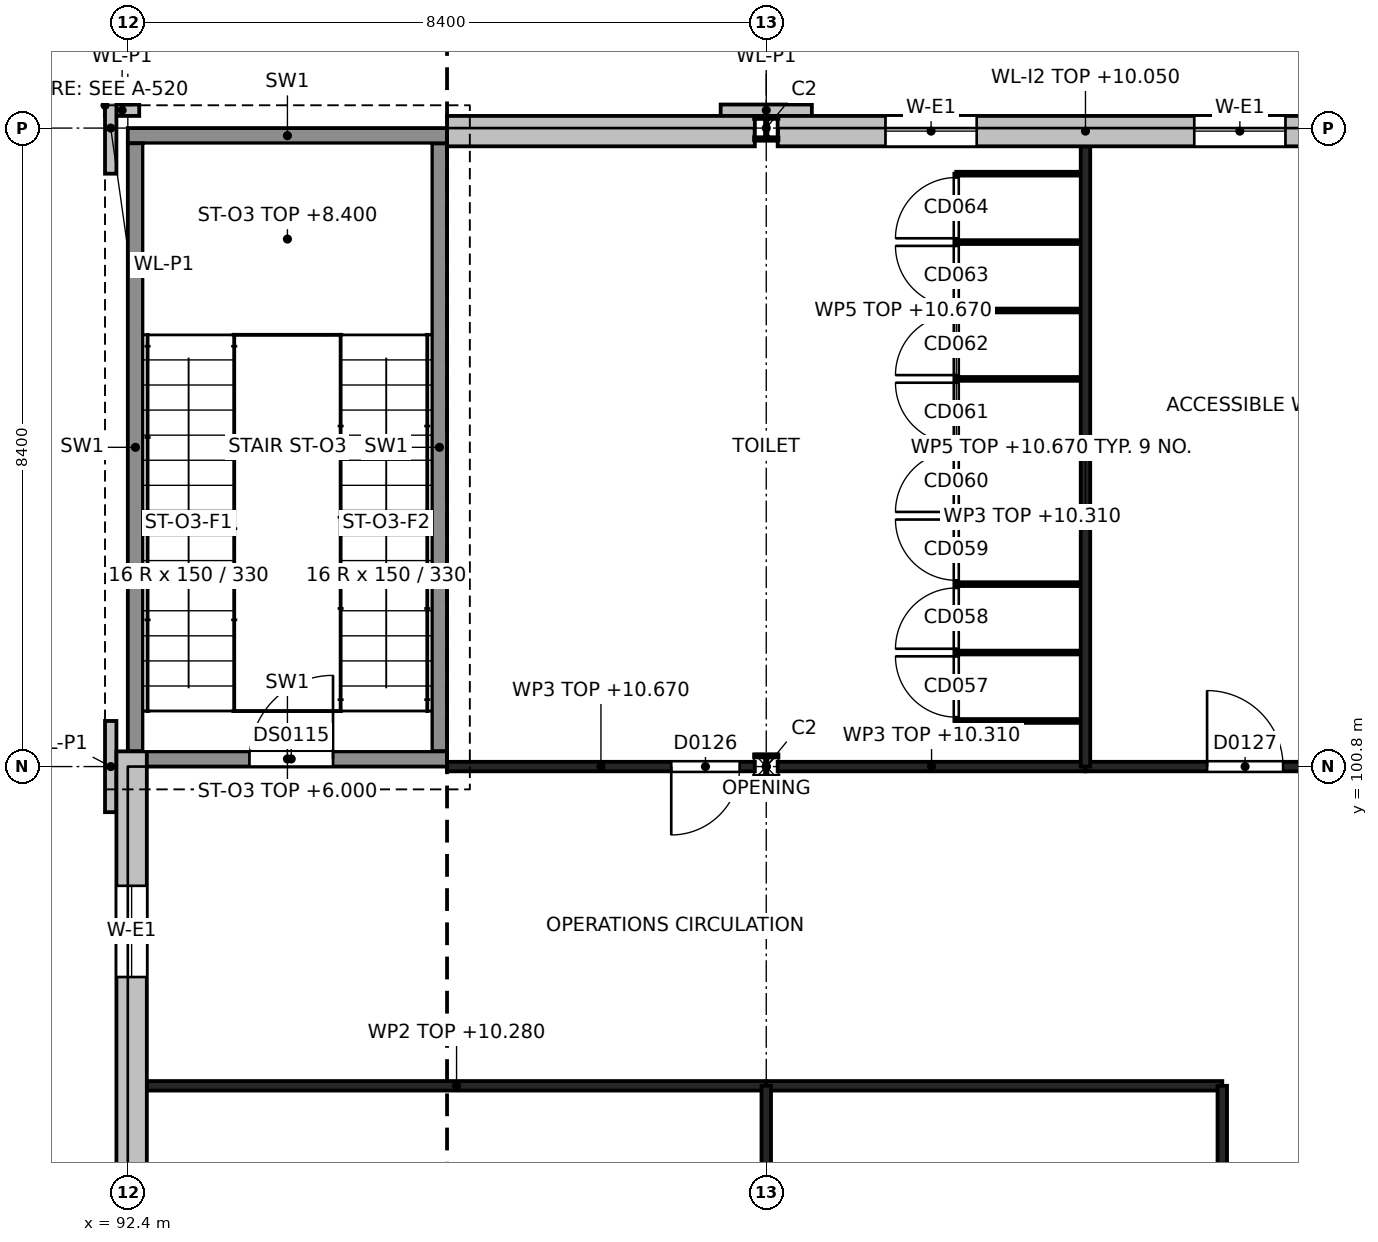
"""IFC4 building model, lengths in metres.
Left out: names, types, materials, properties, quantities, classifications, styles, units other than length and angle.
Written with IfcOpenShell. Run it as: python <this file> out.ifc"""

import sys

from ifc_helpers import new_model, si_unit, direction, frame, frame_2d, origin, origin_2d, place, context, subcontext, project, spatial, rectangle, i_section, extrude, element, fill, save


model = new_model("IFC4")
c1 = context("Model", 3, precision=1e-05, world=origin(), true_north=direction((0.0, 1.0)))
c2 = subcontext(c1, "Body", "Model", "MODEL_VIEW")
j1 = project(units=[si_unit("LENGTHUNIT", "METRE"), si_unit("PLANEANGLEUNIT", "RADIAN")], contexts=[c1])
p1 = place(None, origin())
s1 = spatial("IfcSite", under=j1, at=p1, CompositionType="ELEMENT")
p2 = place(p1, origin())
s2 = spatial("IfcBuilding", under=s1, at=p2, CompositionType="ELEMENT")
p3 = place(p2, frame((0.0, 0.0, 6.0)))
s3 = spatial("IfcBuildingStorey", under=s2, at=p3, CompositionType="ELEMENT", Elevation=6.0)
for number, where, z_axis, x_axis in (
    (1, (100.8, 100.8, 0.0), (0.0, 0.0, 1.0), (1.0, 0.0, 0.0)),
    (2, (100.8, 109.2, 0.0), (0.0, 0.0, 1.0), (1.0, 0.0, 0.0)),
):
    element("IfcColumn", number, at=place(p3, frame(where, z_axis=z_axis, x_axis=x_axis)), inside=s3, PredefinedType="COLUMN", context=c2, shape_type="SweptSolid", body=[
        extrude(i_section(OverallWidth=0.3, OverallDepth=0.3, WebThickness=0.011, FlangeThickness=0.019, at=origin_2d()), origin(), (0.0, 0.0, 1.0), 4.8),
    ])
p4 = place(p3, frame((92.4, 100.9, 0.0), z_axis=(0.0, 0.0, 1.0), x_axis=(1.0, 0.0, 0.0)))
e3 = element("IfcWall", 3, at=p4, inside=s3, PredefinedType="SHEAR", context=c2, shape_type="SweptSolid", body=[
    extrude(rectangle(XDim=4.2, YDim=0.2, at=frame_2d((2.1, 0.0))), origin(), (0.0, 0.0, 1.0), 4.8),
])
p5 = place(p4, frame((1.6, 0.0, 0.0)))
e4 = element("IfcOpeningElement", 4, at=p5, cuts=e3, PredefinedType="OPENING", context=c2, shape_type="SweptSolid", body=[
    extrude(rectangle(XDim=1.1, YDim=2.1, at=frame_2d((0.55, 1.05))), frame((0.0, 0.1, 0.0), z_axis=(0.0, -1.0, 0.0), x_axis=(1.0, 0.0, 0.0)), (0.0, 0.0, 1.0), 0.2),
])
p6 = place(p3, frame((92.4, 109.1, 0.0), z_axis=(0.0, 0.0, 1.0), x_axis=(1.0, 0.0, 0.0)))
e5 = element("IfcWall", 5, at=p6, inside=s3, PredefinedType="SHEAR", context=c2, shape_type="SweptSolid", body=[
    extrude(rectangle(XDim=4.2, YDim=0.2, at=frame_2d((2.1, 0.0))), origin(), (0.0, 0.0, 1.0), 4.8),
])
for number, where, z_axis, x_axis in (
    (6, (92.5, 101.0, 0.0), (0.0, 0.0, 1.0), (0.0, 1.0, 0.0)),
    (7, (96.5, 101.0, 0.0), (0.0, 0.0, 1.0), (0.0, 1.0, 0.0)),
):
    element("IfcWall", number, at=place(p3, frame(where, z_axis=z_axis, x_axis=x_axis)), inside=s3, PredefinedType="SHEAR", context=c2, shape_type="SweptSolid", body=[
        extrude(rectangle(XDim=8.0, YDim=0.2, at=frame_2d((4.0, 0.0))), origin(), (0.0, 0.0, 1.0), 4.8),
    ])
p7 = place(p3, frame((92.45, 92.55, 0.0), z_axis=(0.0, 0.0, 1.0), x_axis=(0.0, 1.0, 0.0)))
e8 = element("IfcWall", 8, at=p7, inside=s3, PredefinedType="SOLIDWALL", context=c2, shape_type="SweptSolid", body=[
    extrude(rectangle(XDim=8.45, YDim=0.4, at=frame_2d((4.225, 0.0))), origin(), (0.0, 0.0, 1.0), 4.05),
])
p8 = place(p7, frame((1.419, 0.0, 0.9)))
e9 = element("IfcOpeningElement", 9, at=p8, cuts=e8, PredefinedType="OPENING", context=c2, shape_type="SweptSolid", body=[
    extrude(rectangle(XDim=1.2, YDim=3.0, at=frame_2d((0.6, 1.5))), frame((0.0, 0.2, 0.0), z_axis=(0.0, -1.0, 0.0), x_axis=(1.0, 0.0, 0.0)), (0.0, 0.0, 1.0), 0.4),
])
p9 = place(p7, frame((5.481, 0.0, 0.9)))
e10 = element("IfcOpeningElement", 10, at=p9, cuts=e8, PredefinedType="OPENING", context=c2, shape_type="SweptSolid", body=[
    extrude(rectangle(XDim=1.2, YDim=3.0, at=frame_2d((0.6, 1.5))), frame((0.0, 0.2, 0.0), z_axis=(0.0, -1.0, 0.0), x_axis=(1.0, 0.0, 0.0)), (0.0, 0.0, 1.0), 0.4),
])
for number, where, z_axis, x_axis in (
    (11, (92.175, 100.2, 0.0), (0.0, 0.0, 1.0), (0.0, 1.0, 0.0)),
    (12, (92.175, 108.6, 0.0), (0.0, 0.0, 1.0), (0.0, 1.0, 0.0)),
):
    element("IfcWall", number, at=place(p3, frame(where, z_axis=z_axis, x_axis=x_axis)), inside=s3, PredefinedType="SOLIDWALL", context=c2, shape_type="SweptSolid", body=[
        extrude(rectangle(XDim=1.2, YDim=0.15, at=frame_2d((0.6, 0.0))), origin(), (0.0, 0.0, 1.0), 4.8),
    ])
p10 = place(p3, frame((96.6, 109.16, 0.0), z_axis=(0.0, 0.0, 1.0), x_axis=(1.0, 0.0, 0.0)))
e13 = element("IfcWall", 13, at=p10, inside=s3, PredefinedType="SOLIDWALL", context=c2, shape_type="SweptSolid", body=[
    extrude(rectangle(XDim=4.05, YDim=0.4, at=frame_2d((2.025, 0.0))), origin(), (0.0, 0.0, 1.0), 4.05),
])
p11 = place(p3, frame((100.95, 109.16, 0.0), z_axis=(0.0, 0.0, 1.0), x_axis=(1.0, 0.0, 0.0)))
e14 = element("IfcWall", 14, at=p11, inside=s3, PredefinedType="SOLIDWALL", context=c2, shape_type="SweptSolid", body=[
    extrude(rectangle(XDim=8.1, YDim=0.4, at=frame_2d((4.05, 0.0))), origin(), (0.0, 0.0, 1.0), 4.05),
])
p12 = place(p11, frame((1.419, 0.0, 0.9)))
e15 = element("IfcOpeningElement", 15, at=p12, cuts=e14, PredefinedType="OPENING", context=c2, shape_type="SweptSolid", body=[
    extrude(rectangle(XDim=1.2, YDim=3.0, at=frame_2d((0.6, 1.5))), frame((0.0, 0.2, 0.0), z_axis=(0.0, -1.0, 0.0), x_axis=(1.0, 0.0, 0.0)), (0.0, 0.0, 1.0), 0.4),
])
p13 = place(p11, frame((5.481, 0.0, 0.9)))
e16 = element("IfcOpeningElement", 16, at=p13, cuts=e14, PredefinedType="OPENING", context=c2, shape_type="SweptSolid", body=[
    extrude(rectangle(XDim=1.2, YDim=3.0, at=frame_2d((0.6, 1.5))), frame((0.0, 0.2, 0.0), z_axis=(0.0, -1.0, 0.0), x_axis=(1.0, 0.0, 0.0)), (0.0, 0.0, 1.0), 0.4),
])
p14 = place(p3, frame((92.1, 109.435, 0.0), z_axis=(0.0, 0.0, 1.0), x_axis=(1.0, 0.0, 0.0)))
e17 = element("IfcWall", 17, at=p14, inside=s3, PredefinedType="SOLIDWALL", context=c2, shape_type="SweptSolid", body=[
    extrude(rectangle(XDim=0.45, YDim=0.15, at=frame_2d((0.225, 0.0))), origin(), (0.0, 0.0, 1.0), 4.8),
])
p15 = place(p3, frame((100.2, 109.435, 0.0), z_axis=(0.0, 0.0, 1.0), x_axis=(1.0, 0.0, 0.0)))
e18 = element("IfcWall", 18, at=p15, inside=s3, PredefinedType="SOLIDWALL", context=c2, shape_type="SweptSolid", body=[
    extrude(rectangle(XDim=1.2, YDim=0.15, at=frame_2d((0.6, 0.0))), origin(), (0.0, 0.0, 1.0), 4.8),
])
p16 = place(p3, frame((92.65, 96.6, 0.0), z_axis=(0.0, 0.0, 1.0), x_axis=(1.0, 0.0, 0.0)))
e19 = element("IfcWall", 19, at=p16, inside=s3, PredefinedType="PARTITIONING", context=c2, shape_type="SweptSolid", body=[
    extrude(rectangle(XDim=8.15, YDim=0.125, at=frame_2d((4.075, 0.0))), origin(), (0.0, 0.0, 1.0), 4.28),
])
p17 = place(p3, frame((100.8, 96.6, 0.0), z_axis=(0.0, 0.0, 1.0), x_axis=(1.0, 0.0, 0.0)))
e20 = element("IfcWall", 20, at=p17, inside=s3, PredefinedType="PARTITIONING", context=c2, shape_type="SweptSolid", body=[
    extrude(rectangle(XDim=6.0, YDim=0.125, at=frame_2d((3.0, 0.0))), origin(), (0.0, 0.0, 1.0), 4.28),
])
p18 = place(p3, frame((106.8, 84.0, 0.0), z_axis=(0.0, 0.0, 1.0), x_axis=(0.0, 1.0, 0.0)))
e21 = element("IfcWall", 21, at=p18, inside=s3, PredefinedType="PARTITIONING", context=c2, shape_type="SweptSolid", body=[
    extrude(rectangle(XDim=12.6, YDim=0.125, at=frame_2d((6.3, 0.0))), origin(), (0.0, 0.0, 1.0), 4.31),
])
p19 = place(p18, frame((5.35, 0.0, 0.0)))
e22 = element("IfcOpeningElement", 22, at=p19, cuts=e21, PredefinedType="OPENING", context=c2, shape_type="SweptSolid", body=[
    extrude(rectangle(XDim=1.8, YDim=2.1, at=frame_2d((0.9, 1.05))), frame((0.0, 0.062, 0.0), z_axis=(0.0, -1.0, 0.0), x_axis=(1.0, 0.0, 0.0)), (0.0, 0.0, 1.0), 0.125),
])
p20 = place(p3, frame((96.6, 100.8, 0.0), z_axis=(0.0, 0.0, 1.0), x_axis=(1.0, 0.0, 0.0)))
e23 = element("IfcWall", 23, at=p20, inside=s3, PredefinedType="PARTITIONING", context=c2, shape_type="SweptSolid", body=[
    extrude(rectangle(XDim=4.05, YDim=0.125, at=frame_2d((2.025, 0.0))), origin(), (0.0, 0.0, 1.0), 4.67),
])
p21 = place(p20, frame((2.95, 0.0, 0.0)))
e24 = element("IfcOpeningElement", 24, at=p21, cuts=e23, PredefinedType="OPENING", context=c2, shape_type="SweptSolid", body=[
    extrude(rectangle(XDim=0.9, YDim=2.1, at=frame_2d((0.45, 1.05))), frame((0.0, 0.062, 0.0), z_axis=(0.0, -1.0, 0.0), x_axis=(1.0, 0.0, 0.0)), (0.0, 0.0, 1.0), 0.125),
])
p22 = place(p3, frame((100.95, 100.8, 0.0), z_axis=(0.0, 0.0, 1.0), x_axis=(1.0, 0.0, 0.0)))
e25 = element("IfcWall", 25, at=p22, inside=s3, PredefinedType="PARTITIONING", context=c2, shape_type="SweptSolid", body=[
    extrude(rectangle(XDim=4.05, YDim=0.125, at=frame_2d((2.025, 0.0))), origin(), (0.0, 0.0, 1.0), 4.31),
])
p23 = place(p3, frame((105.0, 100.8, 0.0), z_axis=(0.0, 0.0, 1.0), x_axis=(1.0, 0.0, 0.0)))
e26 = element("IfcWall", 26, at=p23, inside=s3, PredefinedType="PARTITIONING", context=c2, shape_type="SweptSolid", body=[
    extrude(rectangle(XDim=4.05, YDim=0.125, at=frame_2d((2.025, 0.0))), origin(), (0.0, 0.0, 1.0), 4.31),
])
p24 = place(p23, frame((1.6, 0.0, 0.0)))
e27 = element("IfcOpeningElement", 27, at=p24, cuts=e26, PredefinedType="OPENING", context=c2, shape_type="SweptSolid", body=[
    extrude(rectangle(XDim=1.0, YDim=2.1, at=frame_2d((0.5, 1.05))), frame((0.0, 0.062, 0.0), z_axis=(0.0, -1.0, 0.0), x_axis=(1.0, 0.0, 0.0)), (0.0, 0.0, 1.0), 0.125),
])
p25 = place(p3, frame((100.8, 92.55, 0.0), z_axis=(0.0, 0.0, 1.0), x_axis=(0.0, 1.0, 0.0)))
e28 = element("IfcWall", 28, at=p25, inside=s3, PredefinedType="PARTITIONING", context=c2, shape_type="SweptSolid", body=[
    extrude(rectangle(XDim=4.05, YDim=0.125, at=frame_2d((2.025, 0.0))), origin(), (0.0, 0.0, 1.0), 4.28),
])
p26 = place(p3, frame((105.0, 100.8, 0.0), z_axis=(0.0, 0.0, 1.0), x_axis=(0.0, 1.0, 0.0)))
e29 = element("IfcWall", 29, at=p26, inside=s3, PredefinedType="PARTITIONING", context=c2, shape_type="SweptSolid", body=[
    extrude(rectangle(XDim=8.159, YDim=0.125, at=frame_2d((4.08, 0.0))), origin(), (0.0, 0.0, 1.0), 4.31),
])
p27 = place(p3, frame((103.3, 101.4, 0.0), z_axis=(0.0, 0.0, 1.0), x_axis=(0.0, 1.0, 0.0)))
e30 = element("IfcWall", 30, at=p27, inside=s3, PredefinedType="PARTITIONING", context=c2, shape_type="SweptSolid", body=[
    extrude(rectangle(XDim=7.2, YDim=0.05, at=frame_2d((3.6, 0.0))), origin(), (0.0, 0.0, 1.0), 4.67),
])
p28 = place(p27, frame((0.05, 0.0, 0.0)))
e31 = element("IfcOpeningElement", 31, at=p28, cuts=e30, PredefinedType="OPENING", context=c2, shape_type="SweptSolid", body=[
    extrude(rectangle(XDim=0.8, YDim=2.0, at=frame_2d((0.4, 1.0))), frame((0.0, 0.025, 0.0), z_axis=(0.0, -1.0, 0.0), x_axis=(1.0, 0.0, 0.0)), (0.0, 0.0, 1.0), 0.05),
])
p29 = place(p27, frame((0.95, 0.0, 0.0)))
e32 = element("IfcOpeningElement", 32, at=p29, cuts=e30, PredefinedType="OPENING", context=c2, shape_type="SweptSolid", body=[
    extrude(rectangle(XDim=0.8, YDim=2.0, at=frame_2d((0.4, 1.0))), frame((0.0, 0.025, 0.0), z_axis=(0.0, -1.0, 0.0), x_axis=(1.0, 0.0, 0.0)), (0.0, 0.0, 1.0), 0.05),
])
p30 = place(p27, frame((1.85, 0.0, 0.0)))
e33 = element("IfcOpeningElement", 33, at=p30, cuts=e30, PredefinedType="OPENING", context=c2, shape_type="SweptSolid", body=[
    extrude(rectangle(XDim=0.8, YDim=2.0, at=frame_2d((0.4, 1.0))), frame((0.0, 0.025, 0.0), z_axis=(0.0, -1.0, 0.0), x_axis=(1.0, 0.0, 0.0)), (0.0, 0.0, 1.0), 0.05),
])
p31 = place(p27, frame((2.75, 0.0, 0.0)))
e34 = element("IfcOpeningElement", 34, at=p31, cuts=e30, PredefinedType="OPENING", context=c2, shape_type="SweptSolid", body=[
    extrude(rectangle(XDim=0.8, YDim=2.0, at=frame_2d((0.4, 1.0))), frame((0.0, 0.025, 0.0), z_axis=(0.0, -1.0, 0.0), x_axis=(1.0, 0.0, 0.0)), (0.0, 0.0, 1.0), 0.05),
])
p32 = place(p27, frame((3.65, 0.0, 0.0)))
e35 = element("IfcOpeningElement", 35, at=p32, cuts=e30, PredefinedType="OPENING", context=c2, shape_type="SweptSolid", body=[
    extrude(rectangle(XDim=0.8, YDim=2.0, at=frame_2d((0.4, 1.0))), frame((0.0, 0.025, 0.0), z_axis=(0.0, -1.0, 0.0), x_axis=(1.0, 0.0, 0.0)), (0.0, 0.0, 1.0), 0.05),
])
p33 = place(p27, frame((4.55, 0.0, 0.0)))
e36 = element("IfcOpeningElement", 36, at=p33, cuts=e30, PredefinedType="OPENING", context=c2, shape_type="SweptSolid", body=[
    extrude(rectangle(XDim=0.8, YDim=2.0, at=frame_2d((0.4, 1.0))), frame((0.0, 0.025, 0.0), z_axis=(0.0, -1.0, 0.0), x_axis=(1.0, 0.0, 0.0)), (0.0, 0.0, 1.0), 0.05),
])
p34 = place(p27, frame((5.45, 0.0, 0.0)))
e37 = element("IfcOpeningElement", 37, at=p34, cuts=e30, PredefinedType="OPENING", context=c2, shape_type="SweptSolid", body=[
    extrude(rectangle(XDim=0.8, YDim=2.0, at=frame_2d((0.4, 1.0))), frame((0.0, 0.025, 0.0), z_axis=(0.0, -1.0, 0.0), x_axis=(1.0, 0.0, 0.0)), (0.0, 0.0, 1.0), 0.05),
])
p35 = place(p27, frame((6.35, 0.0, 0.0)))
e38 = element("IfcOpeningElement", 38, at=p35, cuts=e30, PredefinedType="OPENING", context=c2, shape_type="SweptSolid", body=[
    extrude(rectangle(XDim=0.8, YDim=2.0, at=frame_2d((0.4, 1.0))), frame((0.0, 0.025, 0.0), z_axis=(0.0, -1.0, 0.0), x_axis=(1.0, 0.0, 0.0)), (0.0, 0.0, 1.0), 0.05),
])
for number, where, z_axis, x_axis in (
    (39, (105.0, 101.4, 0.0), (0.0, 0.0, 1.0), (-1.0, 0.0, 0.0)),
    (40, (105.0, 102.3, 0.0), (0.0, 0.0, 1.0), (-1.0, 0.0, 0.0)),
    (41, (105.0, 103.2, 0.0), (0.0, 0.0, 1.0), (-1.0, 0.0, 0.0)),
    (42, (105.0, 104.1, 0.0), (0.0, 0.0, 1.0), (-1.0, 0.0, 0.0)),
    (43, (105.0, 105.0, 0.0), (0.0, 0.0, 1.0), (-1.0, 0.0, 0.0)),
    (44, (105.0, 105.9, 0.0), (0.0, 0.0, 1.0), (-1.0, 0.0, 0.0)),
    (45, (105.0, 106.8, 0.0), (0.0, 0.0, 1.0), (-1.0, 0.0, 0.0)),
    (46, (105.0, 107.7, 0.0), (0.0, 0.0, 1.0), (-1.0, 0.0, 0.0)),
    (47, (105.0, 108.6, 0.0), (0.0, 0.0, 1.0), (-1.0, 0.0, 0.0)),
):
    element("IfcWall", number, at=place(p3, frame(where, z_axis=z_axis, x_axis=x_axis)), inside=s3, PredefinedType="PARTITIONING", context=c2, shape_type="SweptSolid", body=[
        extrude(rectangle(XDim=1.7, YDim=0.05, at=frame_2d((0.85, 0.0))), origin(), (0.0, 0.0, 1.0), 4.67),
    ])
p36 = place(p9, origin())
e48 = element("IfcWindow", 48, at=p36, inside=s3, PartitioningType="SINGLE_PANEL", PredefinedType="WINDOW", context=c2, shape_type="SweptSolid", body=[
    extrude(rectangle(XDim=1.2, YDim=3.0, at=frame_2d((0.6, 1.5))), frame((0.0, 0.03, 0.0), z_axis=(0.0, -1.0, 0.0), x_axis=(1.0, 0.0, 0.0)), (0.0, 0.0, 1.0), 0.06),
])
fill(e10, e48)
p37 = place(p12, origin())
e49 = element("IfcWindow", 49, at=p37, inside=s3, PartitioningType="SINGLE_PANEL", PredefinedType="WINDOW", context=c2, shape_type="SweptSolid", body=[
    extrude(rectangle(XDim=1.2, YDim=3.0, at=frame_2d((0.6, 1.5))), frame((0.0, 0.03, 0.0), z_axis=(0.0, -1.0, 0.0), x_axis=(1.0, 0.0, 0.0)), (0.0, 0.0, 1.0), 0.06),
])
fill(e15, e49)
p38 = place(p13, origin())
e50 = element("IfcWindow", 50, at=p38, inside=s3, PartitioningType="SINGLE_PANEL", PredefinedType="WINDOW", context=c2, shape_type="SweptSolid", body=[
    extrude(rectangle(XDim=1.2, YDim=3.0, at=frame_2d((0.6, 1.5))), frame((0.0, 0.03, 0.0), z_axis=(0.0, -1.0, 0.0), x_axis=(1.0, 0.0, 0.0)), (0.0, 0.0, 1.0), 0.06),
])
fill(e16, e50)
p39 = place(p21, origin())
e51 = element("IfcDoor", 51, at=p39, inside=s3, OperationType="SINGLE_SWING_LEFT", PredefinedType="DOOR", context=c2, shape_type="SweptSolid", body=[
    extrude(rectangle(XDim=0.9, YDim=2.1, at=frame_2d((0.45, 1.05))), frame((0.0, 0.025, 0.0), z_axis=(0.0, -1.0, 0.0), x_axis=(1.0, 0.0, 0.0)), (0.0, 0.0, 1.0), 0.05),
])
fill(e24, e51)
p40 = place(p24, origin())
e52 = element("IfcDoor", 52, at=p40, inside=s3, OperationType="SINGLE_SWING_LEFT", PredefinedType="DOOR", context=c2, shape_type="SweptSolid", body=[
    extrude(rectangle(XDim=1.0, YDim=2.1, at=frame_2d((0.5, 1.05))), frame((0.0, 0.025, 0.0), z_axis=(0.0, -1.0, 0.0), x_axis=(1.0, 0.0, 0.0)), (0.0, 0.0, 1.0), 0.05),
])
fill(e27, e52)
p41 = place(p5, origin())
e53 = element("IfcDoor", 53, at=p41, inside=s3, OperationType="SINGLE_SWING_RIGHT", PredefinedType="DOOR", context=c2, shape_type="SweptSolid", body=[
    extrude(rectangle(XDim=1.1, YDim=2.1, at=frame_2d((0.55, 1.05))), frame((0.0, 0.025, 0.0), z_axis=(0.0, -1.0, 0.0), x_axis=(1.0, 0.0, 0.0)), (0.0, 0.0, 1.0), 0.05),
])
fill(e4, e53)
p42 = place(p28, origin())
e54 = element("IfcDoor", 54, at=p42, inside=s3, OperationType="SINGLE_SWING_RIGHT", PredefinedType="DOOR", context=c2, shape_type="SweptSolid", body=[
    extrude(rectangle(XDim=0.8, YDim=2.0, at=frame_2d((0.4, 1.0))), frame((0.0, 0.025, 0.0), z_axis=(0.0, -1.0, 0.0), x_axis=(1.0, 0.0, 0.0)), (0.0, 0.0, 1.0), 0.05),
])
fill(e31, e54)
p43 = place(p29, origin())
e55 = element("IfcDoor", 55, at=p43, inside=s3, OperationType="SINGLE_SWING_LEFT", PredefinedType="DOOR", context=c2, shape_type="SweptSolid", body=[
    extrude(rectangle(XDim=0.8, YDim=2.0, at=frame_2d((0.4, 1.0))), frame((0.0, 0.025, 0.0), z_axis=(0.0, -1.0, 0.0), x_axis=(1.0, 0.0, 0.0)), (0.0, 0.0, 1.0), 0.05),
])
fill(e32, e55)
p44 = place(p30, origin())
e56 = element("IfcDoor", 56, at=p44, inside=s3, OperationType="SINGLE_SWING_RIGHT", PredefinedType="DOOR", context=c2, shape_type="SweptSolid", body=[
    extrude(rectangle(XDim=0.8, YDim=2.0, at=frame_2d((0.4, 1.0))), frame((0.0, 0.025, 0.0), z_axis=(0.0, -1.0, 0.0), x_axis=(1.0, 0.0, 0.0)), (0.0, 0.0, 1.0), 0.05),
])
fill(e33, e56)
p45 = place(p31, origin())
e57 = element("IfcDoor", 57, at=p45, inside=s3, OperationType="SINGLE_SWING_LEFT", PredefinedType="DOOR", context=c2, shape_type="SweptSolid", body=[
    extrude(rectangle(XDim=0.8, YDim=2.0, at=frame_2d((0.4, 1.0))), frame((0.0, 0.025, 0.0), z_axis=(0.0, -1.0, 0.0), x_axis=(1.0, 0.0, 0.0)), (0.0, 0.0, 1.0), 0.05),
])
fill(e34, e57)
p46 = place(p32, origin())
e58 = element("IfcDoor", 58, at=p46, inside=s3, OperationType="SINGLE_SWING_RIGHT", PredefinedType="DOOR", context=c2, shape_type="SweptSolid", body=[
    extrude(rectangle(XDim=0.8, YDim=2.0, at=frame_2d((0.4, 1.0))), frame((0.0, 0.025, 0.0), z_axis=(0.0, -1.0, 0.0), x_axis=(1.0, 0.0, 0.0)), (0.0, 0.0, 1.0), 0.05),
])
fill(e35, e58)
p47 = place(p33, origin())
e59 = element("IfcDoor", 59, at=p47, inside=s3, OperationType="SINGLE_SWING_LEFT", PredefinedType="DOOR", context=c2, shape_type="SweptSolid", body=[
    extrude(rectangle(XDim=0.8, YDim=2.0, at=frame_2d((0.4, 1.0))), frame((0.0, 0.025, 0.0), z_axis=(0.0, -1.0, 0.0), x_axis=(1.0, 0.0, 0.0)), (0.0, 0.0, 1.0), 0.05),
])
fill(e36, e59)
p48 = place(p34, origin())
e60 = element("IfcDoor", 60, at=p48, inside=s3, OperationType="SINGLE_SWING_RIGHT", PredefinedType="DOOR", context=c2, shape_type="SweptSolid", body=[
    extrude(rectangle(XDim=0.8, YDim=2.0, at=frame_2d((0.4, 1.0))), frame((0.0, 0.025, 0.0), z_axis=(0.0, -1.0, 0.0), x_axis=(1.0, 0.0, 0.0)), (0.0, 0.0, 1.0), 0.05),
])
fill(e37, e60)
p49 = place(p35, origin())
e61 = element("IfcDoor", 61, at=p49, inside=s3, OperationType="SINGLE_SWING_LEFT", PredefinedType="DOOR", context=c2, shape_type="SweptSolid", body=[
    extrude(rectangle(XDim=0.8, YDim=2.0, at=frame_2d((0.4, 1.0))), frame((0.0, 0.025, 0.0), z_axis=(0.0, -1.0, 0.0), x_axis=(1.0, 0.0, 0.0)), (0.0, 0.0, 1.0), 0.05),
])
fill(e38, e61)
save(model, sys.argv[1])
